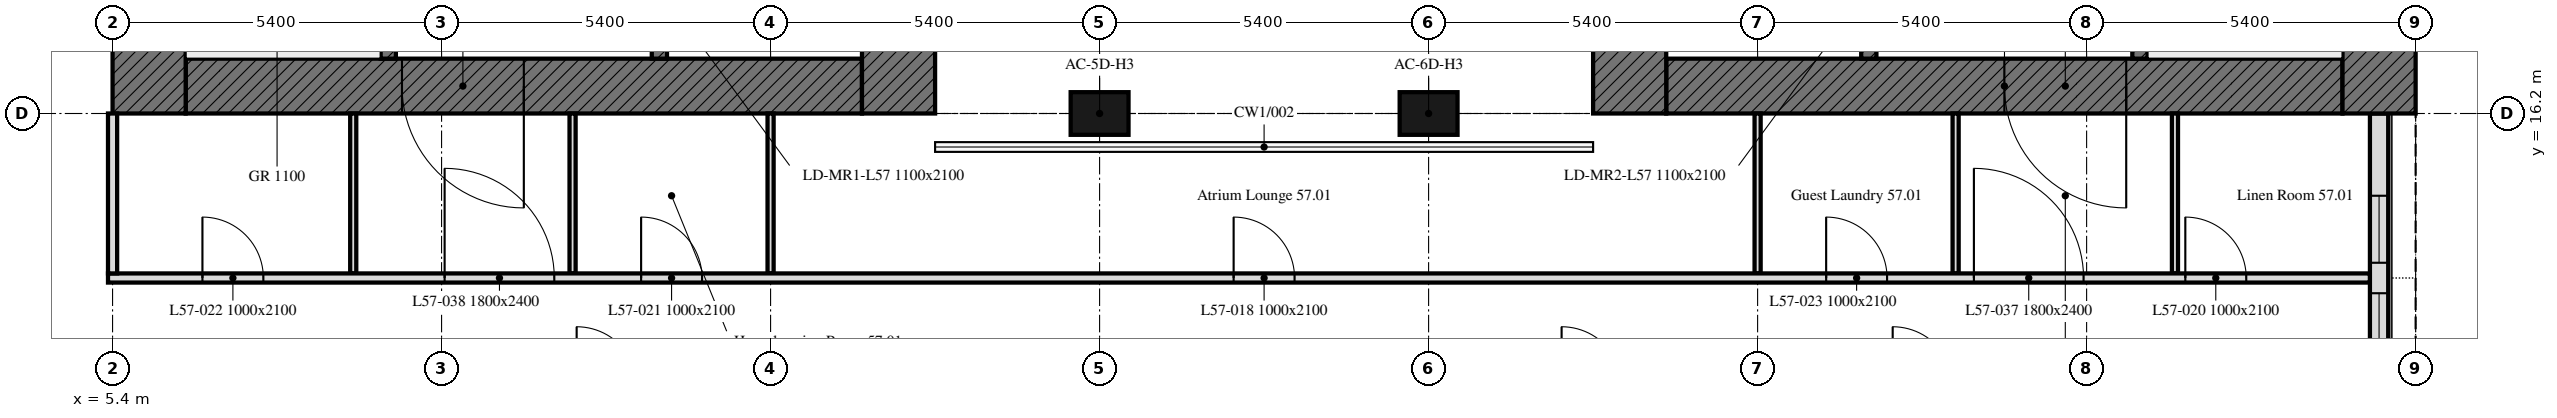
"""IFC4 building model, lengths in metres.
Left out: names, types, materials, properties, quantities, classifications, styles, units other than length and angle.
Written with IfcOpenShell. Run it as: python <this file> out.ifc"""

import sys

from ifc_helpers import new_model, si_unit, direction, frame, frame_2d, origin, origin_2d, place, context, subcontext, project, spatial, rectangle, extrude, element, fill, save


model = new_model("IFC4")
c1 = context("Model", 3, precision=1e-05, world=origin(), true_north=direction((0.0, 1.0)))
c2 = subcontext(c1, "Body", "Model", "MODEL_VIEW")
j1 = project(units=[si_unit("LENGTHUNIT", "METRE"), si_unit("PLANEANGLEUNIT", "RADIAN")], contexts=[c1])
p1 = place(None, origin())
s1 = spatial("IfcSite", under=j1, at=p1, CompositionType="ELEMENT")
p2 = place(p1, origin())
s2 = spatial("IfcBuilding", under=s1, at=p2, CompositionType="ELEMENT")
p3 = place(p2, frame((0.0, 0.0, 226.9)))
s3 = spatial("IfcBuildingStorey", under=s2, at=p3, CompositionType="ELEMENT", Elevation=226.9)
for number, where, z_axis, x_axis in (
    (1, (21.6, 16.2, 0.0), (0.0, 0.0, 1.0), (1.0, 0.0, 0.0)),
    (2, (27.0, 16.2, 0.0), (0.0, 0.0, 1.0), (1.0, 0.0, 0.0)),
):
    element("IfcColumn", number, at=place(p3, frame(where, z_axis=z_axis, x_axis=x_axis)), inside=s3, PredefinedType="COLUMN", context=c2, shape_type="SweptSolid", body=[
        extrude(rectangle(XDim=0.95, YDim=0.7, at=origin_2d()), origin(), (0.0, 0.0, 1.0), 3.0),
    ])
p4 = place(p3, frame((42.6, 10.986, 0.0), z_axis=(0.0, 0.0, 1.0), x_axis=(0.0, 1.0, 0.0)))
e3 = element("IfcWall", 3, at=p4, inside=s3, PredefinedType="SOLIDWALL", context=c2, shape_type="SweptSolid", body=[
    extrude(rectangle(XDim=5.214, YDim=0.3, at=frame_2d((2.607, 0.0))), origin(), (0.0, 0.0, 1.0), 3.0),
])
p5 = place(p4, frame((1.164, 0.0, 0.9)))
e4 = element("IfcOpeningElement", 4, at=p5, cuts=e3, PredefinedType="OPENING", context=c2, shape_type="SweptSolid", body=[
    extrude(rectangle(XDim=1.1, YDim=1.7, at=frame_2d((0.55, 0.85))), frame((0.0, 0.16, 0.0), z_axis=(0.0, -1.0, 0.0), x_axis=(1.0, 0.0, 0.0)), (0.0, 0.0, 1.0), 0.32),
])
p6 = place(p4, frame((2.764, 0.0, 0.9)))
e5 = element("IfcOpeningElement", 5, at=p6, cuts=e3, PredefinedType="OPENING", context=c2, shape_type="SweptSolid", body=[
    extrude(rectangle(XDim=1.1, YDim=1.7, at=frame_2d((0.55, 0.85))), frame((0.0, 0.16, 0.0), z_axis=(0.0, -1.0, 0.0), x_axis=(1.0, 0.0, 0.0)), (0.0, 0.0, 1.0), 0.32),
])
p7 = place(p3, frame((17.7, 16.65, 0.0), z_axis=(0.0, 0.0, 1.0), x_axis=(-1.0, 0.0, 0.0)))
e6 = element("IfcWall", 6, at=p7, inside=s3, PredefinedType="SOLIDWALL", context=c2, shape_type="SweptSolid", body=[
    extrude(rectangle(XDim=11.1, YDim=0.9, at=frame_2d((5.55, 0.0))), origin(), (0.0, 0.0, 1.0), 3.0),
])
p8 = place(p7, frame((5.55, 0.0, 0.0)))
e7 = element("IfcOpeningElement", 7, at=p8, cuts=e6, PredefinedType="OPENING", context=c2, shape_type="SweptSolid", body=[
    extrude(rectangle(XDim=2.0, YDim=2.4, at=frame_2d((1.0, 1.2))), frame((0.0, 0.45, 0.0), z_axis=(0.0, -1.0, 0.0), x_axis=(1.0, 0.0, 0.0)), (0.0, 0.0, 1.0), 0.9),
])
for number, where, z_axis, x_axis in (
    (8, (6.0, 16.2, 0.0), (0.0, 0.0, 1.0), (0.0, 1.0, 0.0)),
    (9, (18.3, 32.4, 0.0), (0.0, 0.0, 1.0), (0.0, -1.0, 0.0)),
):
    element("IfcWall", number, at=place(p3, frame(where, z_axis=z_axis, x_axis=x_axis)), inside=s3, PredefinedType="SOLIDWALL", context=c2, shape_type="SweptSolid", body=[
        extrude(rectangle(XDim=16.2, YDim=1.2, at=frame_2d((8.1, 0.0))), origin(), (0.0, 0.0, 1.0), 3.0),
    ])
p9 = place(p3, frame((9.925, 17.1, 0.0), z_axis=(0.0, 0.0, 1.0), x_axis=(0.0, 1.0, 0.0)))
e10 = element("IfcWall", 10, at=p9, inside=s3, PredefinedType="SOLIDWALL", context=c2, shape_type="SweptSolid", body=[
    extrude(rectangle(XDim=14.4, YDim=0.25, at=frame_2d((7.2, 0.0))), origin(), (0.0, 0.0, 1.0), 3.0),
])
p10 = place(p9, frame((4.6, 0.0, 0.0)))
e11 = element("IfcOpeningElement", 11, at=p10, cuts=e10, PredefinedType="OPENING", context=c2, shape_type="SweptSolid", body=[
    extrude(rectangle(XDim=1.0, YDim=2.1, at=frame_2d((0.5, 1.05))), frame((0.0, 0.125, 0.0), z_axis=(0.0, -1.0, 0.0), x_axis=(1.0, 0.0, 0.0)), (0.0, 0.0, 1.0), 0.25),
])
p11 = place(p9, frame((7.062, 0.0, 0.0)))
e12 = element("IfcOpeningElement", 12, at=p11, cuts=e10, PredefinedType="OPENING", context=c2, shape_type="SweptSolid", body=[
    extrude(rectangle(XDim=1.2, YDim=2.1, at=frame_2d((0.6, 1.05))), frame((0.0, 0.125, 0.0), z_axis=(0.0, -1.0, 0.0), x_axis=(1.0, 0.0, 0.0)), (0.0, 0.0, 1.0), 0.25),
])
p12 = place(p9, frame((10.106, 0.0, 0.0)))
e13 = element("IfcOpeningElement", 13, at=p12, cuts=e10, PredefinedType="OPENING", context=c2, shape_type="SweptSolid", body=[
    extrude(rectangle(XDim=0.9, YDim=2.1, at=frame_2d((0.45, 1.05))), frame((0.0, 0.125, 0.0), z_axis=(0.0, -1.0, 0.0), x_axis=(1.0, 0.0, 0.0)), (0.0, 0.0, 1.0), 0.25),
])
p13 = place(p9, frame((12.048, 0.0, 0.0)))
e14 = element("IfcOpeningElement", 14, at=p13, cuts=e10, PredefinedType="OPENING", context=c2, shape_type="SweptSolid", body=[
    extrude(rectangle(XDim=0.9, YDim=2.1, at=frame_2d((0.45, 1.05))), frame((0.0, 0.125, 0.0), z_axis=(0.0, -1.0, 0.0), x_axis=(1.0, 0.0, 0.0)), (0.0, 0.0, 1.0), 0.25),
])
p14 = place(p9, frame((13.354, 0.0, 0.0)))
e15 = element("IfcOpeningElement", 15, at=p14, cuts=e10, PredefinedType="OPENING", context=c2, shape_type="SweptSolid", body=[
    extrude(rectangle(XDim=0.9, YDim=2.1, at=frame_2d((0.45, 1.05))), frame((0.0, 0.125, 0.0), z_axis=(0.0, -1.0, 0.0), x_axis=(1.0, 0.0, 0.0)), (0.0, 0.0, 1.0), 0.25),
])
p15 = place(p3, frame((14.375, 17.1, 0.0), z_axis=(0.0, 0.0, 1.0), x_axis=(0.0, 1.0, 0.0)))
e16 = element("IfcWall", 16, at=p15, inside=s3, PredefinedType="SOLIDWALL", context=c2, shape_type="SweptSolid", body=[
    extrude(rectangle(XDim=14.4, YDim=0.25, at=frame_2d((7.2, 0.0))), origin(), (0.0, 0.0, 1.0), 3.0),
])
p16 = place(p15, frame((13.15, 0.0, 0.0)))
e17 = element("IfcOpeningElement", 17, at=p16, cuts=e16, PredefinedType="OPENING", context=c2, shape_type="SweptSolid", body=[
    extrude(rectangle(XDim=1.0, YDim=2.1, at=frame_2d((0.5, 1.05))), frame((0.0, 0.125, 0.0), z_axis=(0.0, -1.0, 0.0), x_axis=(1.0, 0.0, 0.0)), (0.0, 0.0, 1.0), 0.25),
])
p17 = place(p15, frame((0.6, 0.0, 0.0)))
e18 = element("IfcOpeningElement", 18, at=p17, cuts=e16, PredefinedType="OPENING", context=c2, shape_type="SweptSolid", body=[
    extrude(rectangle(XDim=1.1, YDim=2.1, at=frame_2d((0.55, 1.05))), frame((0.0, 0.125, 0.0), z_axis=(0.0, -1.0, 0.0), x_axis=(1.0, 0.0, 0.0)), (0.0, 0.0, 1.0), 0.25),
])
p18 = place(p15, frame((3.25, 0.0, 0.0)))
e19 = element("IfcOpeningElement", 19, at=p18, cuts=e16, PredefinedType="OPENING", context=c2, shape_type="SweptSolid", body=[
    extrude(rectangle(XDim=0.9, YDim=2.1, at=frame_2d((0.45, 1.05))), frame((0.0, 0.125, 0.0), z_axis=(0.0, -1.0, 0.0), x_axis=(1.0, 0.0, 0.0)), (0.0, 0.0, 1.0), 0.25),
])
p19 = place(p3, frame((42.0, 16.65, 0.0), z_axis=(0.0, 0.0, 1.0), x_axis=(-1.0, 0.0, 0.0)))
e20 = element("IfcWall", 20, at=p19, inside=s3, PredefinedType="SOLIDWALL", context=c2, shape_type="SweptSolid", body=[
    extrude(rectangle(XDim=11.1, YDim=0.9, at=frame_2d((5.55, 0.0))), origin(), (0.0, 0.0, 1.0), 3.0),
])
p20 = place(p19, frame((3.55, 0.0, 0.0)))
e21 = element("IfcOpeningElement", 21, at=p20, cuts=e20, PredefinedType="OPENING", context=c2, shape_type="SweptSolid", body=[
    extrude(rectangle(XDim=2.0, YDim=2.4, at=frame_2d((1.0, 1.2))), frame((0.0, 0.45, 0.0), z_axis=(0.0, -1.0, 0.0), x_axis=(1.0, 0.0, 0.0)), (0.0, 0.0, 1.0), 0.9),
])
for number, where, z_axis, x_axis in (
    (22, (42.6, 32.4, 0.0), (0.0, 0.0, 1.0), (0.0, -1.0, 0.0)),
    (23, (30.3, 16.2, 0.0), (0.0, 0.0, 1.0), (0.0, 1.0, 0.0)),
):
    element("IfcWall", number, at=place(p3, frame(where, z_axis=z_axis, x_axis=x_axis)), inside=s3, PredefinedType="SOLIDWALL", context=c2, shape_type="SweptSolid", body=[
        extrude(rectangle(XDim=16.2, YDim=1.2, at=frame_2d((8.1, 0.0))), origin(), (0.0, 0.0, 1.0), 3.0),
    ])
p21 = place(p3, frame((38.675, 17.1, 0.0), z_axis=(0.0, 0.0, 1.0), x_axis=(0.0, 1.0, 0.0)))
e24 = element("IfcWall", 24, at=p21, inside=s3, PredefinedType="SOLIDWALL", context=c2, shape_type="SweptSolid", body=[
    extrude(rectangle(XDim=14.4, YDim=0.25, at=frame_2d((7.2, 0.0))), origin(), (0.0, 0.0, 1.0), 3.0),
])
p22 = place(p21, frame((4.6, 0.0, 0.0)))
e25 = element("IfcOpeningElement", 25, at=p22, cuts=e24, PredefinedType="OPENING", context=c2, shape_type="SweptSolid", body=[
    extrude(rectangle(XDim=1.0, YDim=2.1, at=frame_2d((0.5, 1.05))), frame((0.0, 0.125, 0.0), z_axis=(0.0, -1.0, 0.0), x_axis=(1.0, 0.0, 0.0)), (0.0, 0.0, 1.0), 0.25),
])
p23 = place(p21, frame((7.062, 0.0, 0.0)))
e26 = element("IfcOpeningElement", 26, at=p23, cuts=e24, PredefinedType="OPENING", context=c2, shape_type="SweptSolid", body=[
    extrude(rectangle(XDim=1.2, YDim=2.1, at=frame_2d((0.6, 1.05))), frame((0.0, 0.125, 0.0), z_axis=(0.0, -1.0, 0.0), x_axis=(1.0, 0.0, 0.0)), (0.0, 0.0, 1.0), 0.25),
])
p24 = place(p21, frame((9.726, 0.0, 0.0)))
e27 = element("IfcOpeningElement", 27, at=p24, cuts=e24, PredefinedType="OPENING", context=c2, shape_type="SweptSolid", body=[
    extrude(rectangle(XDim=0.9, YDim=2.1, at=frame_2d((0.45, 1.05))), frame((0.0, 0.125, 0.0), z_axis=(0.0, -1.0, 0.0), x_axis=(1.0, 0.0, 0.0)), (0.0, 0.0, 1.0), 0.25),
])
p25 = place(p21, frame((11.539, 0.0, 0.0)))
e28 = element("IfcOpeningElement", 28, at=p25, cuts=e24, PredefinedType="OPENING", context=c2, shape_type="SweptSolid", body=[
    extrude(rectangle(XDim=0.9, YDim=2.1, at=frame_2d((0.45, 1.05))), frame((0.0, 0.125, 0.0), z_axis=(0.0, -1.0, 0.0), x_axis=(1.0, 0.0, 0.0)), (0.0, 0.0, 1.0), 0.25),
])
p26 = place(p21, frame((13.226, 0.0, 0.0)))
e29 = element("IfcOpeningElement", 29, at=p26, cuts=e24, PredefinedType="OPENING", context=c2, shape_type="SweptSolid", body=[
    extrude(rectangle(XDim=0.9, YDim=2.1, at=frame_2d((0.45, 1.05))), frame((0.0, 0.125, 0.0), z_axis=(0.0, -1.0, 0.0), x_axis=(1.0, 0.0, 0.0)), (0.0, 0.0, 1.0), 0.25),
])
p27 = place(p3, frame((34.225, 17.1, 0.0), z_axis=(0.0, 0.0, 1.0), x_axis=(0.0, 1.0, 0.0)))
e30 = element("IfcWall", 30, at=p27, inside=s3, PredefinedType="SOLIDWALL", context=c2, shape_type="SweptSolid", body=[
    extrude(rectangle(XDim=14.4, YDim=0.25, at=frame_2d((7.2, 0.0))), origin(), (0.0, 0.0, 1.0), 3.0),
])
p28 = place(p27, frame((13.15, 0.0, 0.0)))
e31 = element("IfcOpeningElement", 31, at=p28, cuts=e30, PredefinedType="OPENING", context=c2, shape_type="SweptSolid", body=[
    extrude(rectangle(XDim=1.0, YDim=2.1, at=frame_2d((0.5, 1.05))), frame((0.0, 0.125, 0.0), z_axis=(0.0, -1.0, 0.0), x_axis=(1.0, 0.0, 0.0)), (0.0, 0.0, 1.0), 0.25),
])
p29 = place(p27, frame((0.6, 0.0, 0.0)))
e32 = element("IfcOpeningElement", 32, at=p29, cuts=e30, PredefinedType="OPENING", context=c2, shape_type="SweptSolid", body=[
    extrude(rectangle(XDim=1.1, YDim=2.1, at=frame_2d((0.55, 1.05))), frame((0.0, 0.125, 0.0), z_axis=(0.0, -1.0, 0.0), x_axis=(1.0, 0.0, 0.0)), (0.0, 0.0, 1.0), 0.25),
])
p30 = place(p27, frame((3.25, 0.0, 0.0)))
e33 = element("IfcOpeningElement", 33, at=p30, cuts=e30, PredefinedType="OPENING", context=c2, shape_type="SweptSolid", body=[
    extrude(rectangle(XDim=0.9, YDim=2.1, at=frame_2d((0.45, 1.05))), frame((0.0, 0.125, 0.0), z_axis=(0.0, -1.0, 0.0), x_axis=(1.0, 0.0, 0.0)), (0.0, 0.0, 1.0), 0.25),
])
for number, where, z_axis, x_axis in (
    (34, (32.4, 13.575, 0.0), (0.0, 0.0, 1.0), (0.0, 1.0, 0.0)),
    (35, (16.2, 16.2, 0.0), (0.0, 0.0, 1.0), (0.0, -1.0, 0.0)),
    (36, (39.25, 13.575, 0.0), (0.0, 0.0, 1.0), (0.0, 1.0, 0.0)),
    (37, (35.65, 16.2, 0.0), (0.0, 0.0, 1.0), (0.0, -1.0, 0.0)),
    (38, (12.95, 13.575, 0.0), (0.0, 0.0, 1.0), (0.0, 1.0, 0.0)),
    (39, (9.35, 16.2, 0.0), (0.0, 0.0, 1.0), (0.0, -1.0, 0.0)),
):
    element("IfcWall", number, at=place(p3, frame(where, z_axis=z_axis, x_axis=x_axis)), inside=s3, PredefinedType="PARTITIONING", context=c2, shape_type="SweptSolid", body=[
        extrude(rectangle(XDim=2.625, YDim=0.1, at=frame_2d((1.312, 0.0))), origin(), (0.0, 0.0, 1.0), 3.0),
    ])
p31 = place(p3, frame((5.325, 13.5, 0.0), z_axis=(0.0, 0.0, 1.0), x_axis=(1.0, 0.0, 0.0)))
e40 = element("IfcWall", 40, at=p31, inside=s3, PredefinedType="PARTITIONING", context=c2, shape_type="SweptSolid", body=[
    extrude(rectangle(XDim=37.124, YDim=0.15, at=frame_2d((18.562, 0.0))), origin(), (0.0, 0.0, 1.0), 3.0),
])
p32 = place(p31, frame((18.475, 0.0, 0.0)))
e41 = element("IfcOpeningElement", 41, at=p32, cuts=e40, PredefinedType="OPENING", context=c2, shape_type="SweptSolid", body=[
    extrude(rectangle(XDim=1.0, YDim=2.1, at=frame_2d((0.5, 1.05))), frame((0.0, 0.075, 0.0), z_axis=(0.0, -1.0, 0.0), x_axis=(1.0, 0.0, 0.0)), (0.0, 0.0, 1.0), 0.15),
])
p33 = place(p31, frame((34.095, 0.0, 0.0)))
e42 = element("IfcOpeningElement", 42, at=p33, cuts=e40, PredefinedType="OPENING", context=c2, shape_type="SweptSolid", body=[
    extrude(rectangle(XDim=1.0, YDim=2.1, at=frame_2d((0.5, 1.05))), frame((0.0, 0.075, 0.0), z_axis=(0.0, -1.0, 0.0), x_axis=(1.0, 0.0, 0.0)), (0.0, 0.0, 1.0), 0.15),
])
p34 = place(p31, frame((8.75, 0.0, 0.0)))
e43 = element("IfcOpeningElement", 43, at=p34, cuts=e40, PredefinedType="OPENING", context=c2, shape_type="SweptSolid", body=[
    extrude(rectangle(XDim=1.0, YDim=2.1, at=frame_2d((0.5, 1.05))), frame((0.0, 0.075, 0.0), z_axis=(0.0, -1.0, 0.0), x_axis=(1.0, 0.0, 0.0)), (0.0, 0.0, 1.0), 0.15),
])
p35 = place(p31, frame((1.55, 0.0, 0.0)))
e44 = element("IfcOpeningElement", 44, at=p35, cuts=e40, PredefinedType="OPENING", context=c2, shape_type="SweptSolid", body=[
    extrude(rectangle(XDim=1.0, YDim=2.1, at=frame_2d((0.5, 1.05))), frame((0.0, 0.075, 0.0), z_axis=(0.0, -1.0, 0.0), x_axis=(1.0, 0.0, 0.0)), (0.0, 0.0, 1.0), 0.15),
])
p36 = place(p31, frame((28.2, 0.0, 0.0)))
e45 = element("IfcOpeningElement", 45, at=p36, cuts=e40, PredefinedType="OPENING", context=c2, shape_type="SweptSolid", body=[
    extrude(rectangle(XDim=1.0, YDim=2.1, at=frame_2d((0.5, 1.05))), frame((0.0, 0.075, 0.0), z_axis=(0.0, -1.0, 0.0), x_axis=(1.0, 0.0, 0.0)), (0.0, 0.0, 1.0), 0.15),
])
p37 = place(p31, frame((30.625, 0.0, 0.0)))
e46 = element("IfcOpeningElement", 46, at=p37, cuts=e40, PredefinedType="OPENING", context=c2, shape_type="SweptSolid", body=[
    extrude(rectangle(XDim=1.8, YDim=2.4, at=frame_2d((0.9, 1.2))), frame((0.0, 0.075, 0.0), z_axis=(0.0, -1.0, 0.0), x_axis=(1.0, 0.0, 0.0)), (0.0, 0.0, 1.0), 0.15),
])
p38 = place(p31, frame((5.525, 0.0, 0.0)))
e47 = element("IfcOpeningElement", 47, at=p38, cuts=e40, PredefinedType="OPENING", context=c2, shape_type="SweptSolid", body=[
    extrude(rectangle(XDim=1.8, YDim=2.4, at=frame_2d((0.9, 1.2))), frame((0.0, 0.075, 0.0), z_axis=(0.0, -1.0, 0.0), x_axis=(1.0, 0.0, 0.0)), (0.0, 0.0, 1.0), 0.15),
])
p39 = place(p3, frame((5.4, 13.575, 0.0), z_axis=(0.0, 0.0, 1.0), x_axis=(0.0, 1.0, 0.0)))
e48 = element("IfcWall", 48, at=p39, inside=s3, PredefinedType="PARTITIONING", context=c2, shape_type="SweptSolid", body=[
    extrude(rectangle(XDim=2.625, YDim=0.15, at=frame_2d((1.312, 0.0))), origin(), (0.0, 0.0, 1.0), 3.0),
])
p40 = place(p5, origin())
e49 = element("IfcWindow", 49, at=p40, inside=s3, PartitioningType="SINGLE_PANEL", PredefinedType="WINDOW", context=c2, shape_type="SweptSolid", body=[
    extrude(rectangle(XDim=1.1, YDim=1.7, at=frame_2d((0.55, 0.85))), frame((0.0, 0.03, 0.0), z_axis=(0.0, -1.0, 0.0), x_axis=(1.0, 0.0, 0.0)), (0.0, 0.0, 1.0), 0.06),
])
fill(e4, e49)
p41 = place(p6, origin())
e50 = element("IfcWindow", 50, at=p41, inside=s3, PartitioningType="SINGLE_PANEL", PredefinedType="WINDOW", context=c2, shape_type="SweptSolid", body=[
    extrude(rectangle(XDim=1.1, YDim=1.7, at=frame_2d((0.55, 0.85))), frame((0.0, 0.03, 0.0), z_axis=(0.0, -1.0, 0.0), x_axis=(1.0, 0.0, 0.0)), (0.0, 0.0, 1.0), 0.06),
])
fill(e5, e50)
p42 = place(p8, origin())
e51 = element("IfcDoor", 51, at=p42, inside=s3, OperationType="DOUBLE_DOOR_SINGLE_SWING", PredefinedType="DOOR", context=c2, shape_type="SweptSolid", body=[
    extrude(rectangle(XDim=2.0, YDim=2.4, at=frame_2d((1.0, 1.2))), frame((0.0, 0.025, 0.0), z_axis=(0.0, -1.0, 0.0), x_axis=(1.0, 0.0, 0.0)), (0.0, 0.0, 1.0), 0.05),
])
fill(e7, e51)
p43 = place(p20, origin())
e52 = element("IfcDoor", 52, at=p43, inside=s3, OperationType="DOUBLE_DOOR_SINGLE_SWING", PredefinedType="DOOR", context=c2, shape_type="SweptSolid", body=[
    extrude(rectangle(XDim=2.0, YDim=2.4, at=frame_2d((1.0, 1.2))), frame((0.0, 0.025, 0.0), z_axis=(0.0, -1.0, 0.0), x_axis=(1.0, 0.0, 0.0)), (0.0, 0.0, 1.0), 0.05),
])
fill(e21, e52)
p44 = place(p32, origin())
e53 = element("IfcDoor", 53, at=p44, inside=s3, OperationType="SINGLE_SWING_RIGHT", PredefinedType="DOOR", context=c2, shape_type="SweptSolid", body=[
    extrude(rectangle(XDim=1.0, YDim=2.1, at=frame_2d((0.5, 1.05))), frame((0.0, 0.025, 0.0), z_axis=(0.0, -1.0, 0.0), x_axis=(1.0, 0.0, 0.0)), (0.0, 0.0, 1.0), 0.05),
])
fill(e41, e53)
p45 = place(p33, origin())
e54 = element("IfcDoor", 54, at=p45, inside=s3, OperationType="SINGLE_SWING_LEFT", PredefinedType="DOOR", context=c2, shape_type="SweptSolid", body=[
    extrude(rectangle(XDim=1.0, YDim=2.1, at=frame_2d((0.5, 1.05))), frame((0.0, 0.025, 0.0), z_axis=(0.0, -1.0, 0.0), x_axis=(1.0, 0.0, 0.0)), (0.0, 0.0, 1.0), 0.05),
])
fill(e42, e54)
p46 = place(p34, origin())
e55 = element("IfcDoor", 55, at=p46, inside=s3, OperationType="SINGLE_SWING_RIGHT", PredefinedType="DOOR", context=c2, shape_type="SweptSolid", body=[
    extrude(rectangle(XDim=1.0, YDim=2.1, at=frame_2d((0.5, 1.05))), frame((0.0, 0.025, 0.0), z_axis=(0.0, -1.0, 0.0), x_axis=(1.0, 0.0, 0.0)), (0.0, 0.0, 1.0), 0.05),
])
fill(e43, e55)
p47 = place(p35, origin())
e56 = element("IfcDoor", 56, at=p47, inside=s3, OperationType="SINGLE_SWING_LEFT", PredefinedType="DOOR", context=c2, shape_type="SweptSolid", body=[
    extrude(rectangle(XDim=1.0, YDim=2.1, at=frame_2d((0.5, 1.05))), frame((0.0, 0.025, 0.0), z_axis=(0.0, -1.0, 0.0), x_axis=(1.0, 0.0, 0.0)), (0.0, 0.0, 1.0), 0.05),
])
fill(e44, e56)
p48 = place(p36, origin())
e57 = element("IfcDoor", 57, at=p48, inside=s3, OperationType="SINGLE_SWING_RIGHT", PredefinedType="DOOR", context=c2, shape_type="SweptSolid", body=[
    extrude(rectangle(XDim=1.0, YDim=2.1, at=frame_2d((0.5, 1.05))), frame((0.0, 0.025, 0.0), z_axis=(0.0, -1.0, 0.0), x_axis=(1.0, 0.0, 0.0)), (0.0, 0.0, 1.0), 0.05),
])
fill(e45, e57)
p49 = place(p37, origin())
e58 = element("IfcDoor", 58, at=p49, inside=s3, OperationType="DOUBLE_DOOR_SINGLE_SWING", PredefinedType="DOOR", context=c2, shape_type="SweptSolid", body=[
    extrude(rectangle(XDim=1.8, YDim=2.4, at=frame_2d((0.9, 1.2))), frame((0.0, 0.025, 0.0), z_axis=(0.0, -1.0, 0.0), x_axis=(1.0, 0.0, 0.0)), (0.0, 0.0, 1.0), 0.05),
])
fill(e46, e58)
p50 = place(p38, origin())
e59 = element("IfcDoor", 59, at=p50, inside=s3, OperationType="DOUBLE_DOOR_SINGLE_SWING", PredefinedType="DOOR", context=c2, shape_type="SweptSolid", body=[
    extrude(rectangle(XDim=1.8, YDim=2.4, at=frame_2d((0.9, 1.2))), frame((0.0, 0.025, 0.0), z_axis=(0.0, -1.0, 0.0), x_axis=(1.0, 0.0, 0.0)), (0.0, 0.0, 1.0), 0.05),
])
fill(e47, e59)
save(model, sys.argv[1])
